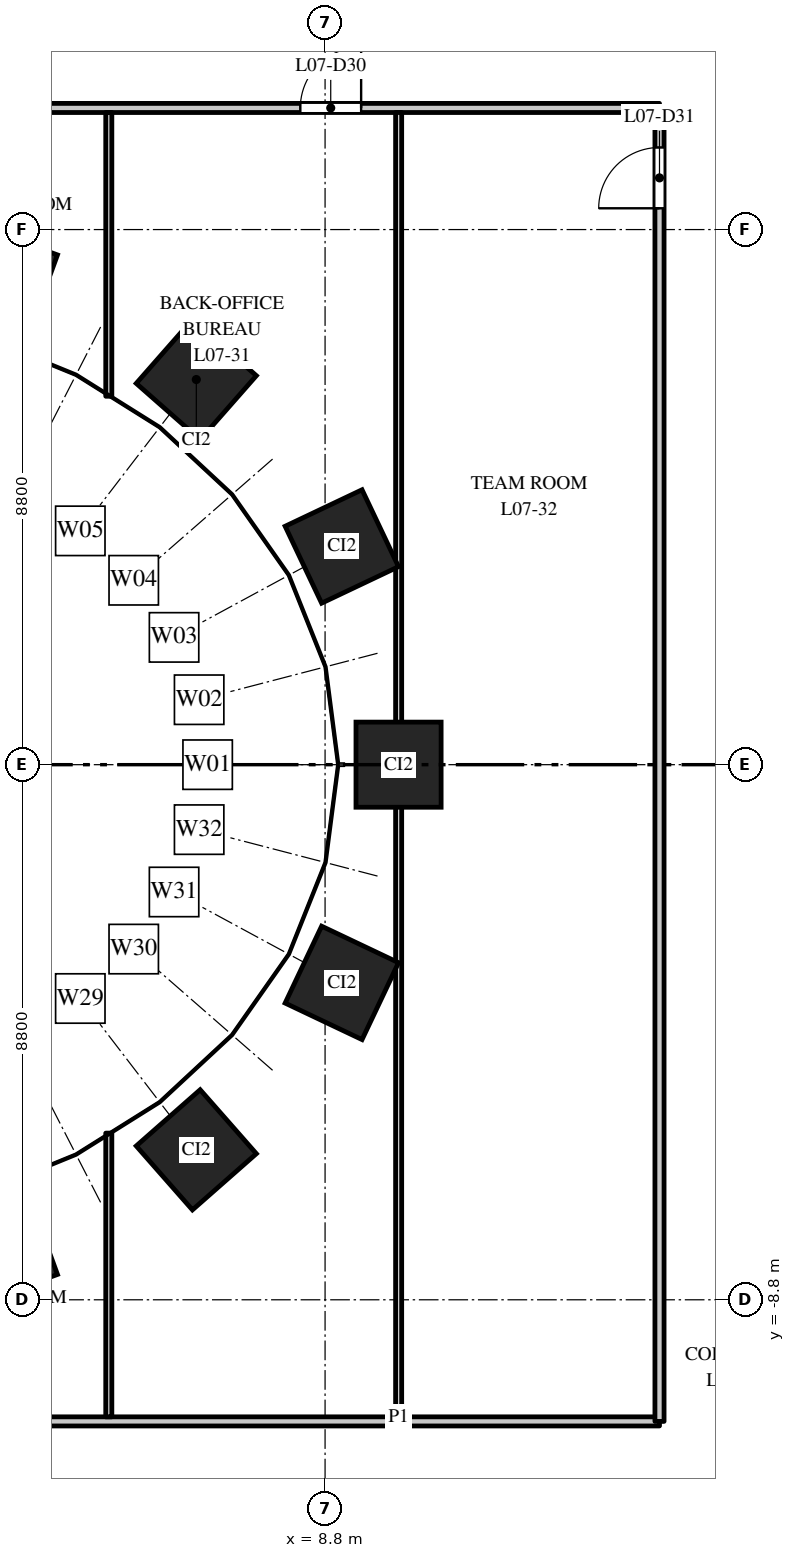
"""IFC4 building model, lengths in metres.
Left out: names, types, materials, properties, quantities, classifications, styles, units other than length and angle.
Written with IfcOpenShell. Run it as: python <this file> out.ifc"""

import sys

from ifc_helpers import new_model, si_unit, direction, frame, frame_2d, origin, origin_2d, place, context, subcontext, project, spatial, rectangle, extrude, element, fill, save


model = new_model("IFC4")
c1 = context("Model", 3, precision=1e-05, world=origin(), true_north=direction((0.0, 1.0)))
c2 = subcontext(c1, "Body", "Model", "MODEL_VIEW")
j1 = project(units=[si_unit("LENGTHUNIT", "METRE"), si_unit("PLANEANGLEUNIT", "RADIAN")], contexts=[c1])
p1 = place(None, origin())
s1 = spatial("IfcSite", under=j1, at=p1, CompositionType="ELEMENT")
p2 = place(p1, origin())
s2 = spatial("IfcBuilding", under=s1, at=p2, CompositionType="ELEMENT")
p3 = place(p2, frame((0.0, 0.0, 38.5)))
s3 = spatial("IfcBuildingStorey", under=s2, at=p3, CompositionType="ELEMENT", Elevation=38.5)
for number, where, z_axis, x_axis in (
    (1, (10.008, 0.0, 0.0), (0.0, 0.0, 1.0), (0.0, 1.0, 0.0)),
    (2, (9.076, 3.588, 0.0), (0.0, 0.0, 1.0), (-0.429, 0.903, 0.0)),
    (3, (6.682, 6.334, 0.0), (0.0, 0.0, 1.0), (-0.751, 0.66, 0.0)),
    (4, (3.501, 7.967, 0.0), (0.0, 0.0, 1.0), (-0.939, 0.344, 0.0)),
    (5, (3.501, -7.967, 0.0), (0.0, 0.0, 1.0), (0.939, 0.344, 0.0)),
    (6, (6.682, -6.334, 0.0), (0.0, 0.0, 1.0), (0.751, 0.66, 0.0)),
    (7, (9.076, -3.588, 0.0), (0.0, 0.0, 1.0), (0.429, 0.903, 0.0)),
):
    element("IfcColumn", number, at=place(p3, frame(where, z_axis=z_axis, x_axis=x_axis)), inside=s3, PredefinedType="COLUMN", context=c2, shape_type="SweptSolid", body=[
        extrude(rectangle(XDim=1.4, YDim=1.4, at=origin_2d()), origin(), (0.0, 0.0, 1.0), 4.0),
    ])
p4 = place(p3, frame((-14.3, -10.8, 0.0), z_axis=(0.0, 0.0, 1.0), x_axis=(1.0, 0.0, 0.0)))
e8 = element("IfcWall", 8, at=p4, inside=s3, PredefinedType="PARTITIONING", context=c2, shape_type="SweptSolid", body=[
    extrude(rectangle(XDim=28.6, YDim=0.15, at=frame_2d((14.3, 0.0))), origin(), (0.0, 0.0, 1.0), 2.85),
])
p5 = place(p4, frame((10.627, 0.0, 0.0)))
e9 = element("IfcOpeningElement", 9, at=p5, cuts=e8, PredefinedType="OPENING", context=c2, shape_type="SweptSolid", body=[
    extrude(rectangle(XDim=1.0, YDim=2.1, at=frame_2d((0.5, 1.05))), frame((0.0, 0.085, 0.0), z_axis=(0.0, -1.0, 0.0), x_axis=(1.0, 0.0, 0.0)), (0.0, 0.0, 1.0), 0.17),
])
p6 = place(p4, frame((15.393, 0.0, 0.0)))
e10 = element("IfcOpeningElement", 10, at=p6, cuts=e8, PredefinedType="OPENING", context=c2, shape_type="SweptSolid", body=[
    extrude(rectangle(XDim=1.0, YDim=2.1, at=frame_2d((0.5, 1.05))), frame((0.0, 0.085, 0.0), z_axis=(0.0, -1.0, 0.0), x_axis=(1.0, 0.0, 0.0)), (0.0, 0.0, 1.0), 0.17),
])
p7 = place(p3, frame((-14.3, 10.8, 0.0), z_axis=(0.0, 0.0, 1.0), x_axis=(1.0, 0.0, 0.0)))
e11 = element("IfcWall", 11, at=p7, inside=s3, PredefinedType="PARTITIONING", context=c2, shape_type="SweptSolid", body=[
    extrude(rectangle(XDim=28.6, YDim=0.15, at=frame_2d((14.3, 0.0))), origin(), (0.0, 0.0, 1.0), 2.85),
])
p8 = place(p7, frame((10.66, 0.0, 0.0)))
e12 = element("IfcOpeningElement", 12, at=p8, cuts=e11, PredefinedType="OPENING", context=c2, shape_type="SweptSolid", body=[
    extrude(rectangle(XDim=1.0, YDim=2.1, at=frame_2d((0.5, 1.05))), frame((0.0, 0.085, 0.0), z_axis=(0.0, -1.0, 0.0), x_axis=(1.0, 0.0, 0.0)), (0.0, 0.0, 1.0), 0.17),
])
p9 = place(p7, frame((15.427, 0.0, 0.0)))
e13 = element("IfcOpeningElement", 13, at=p9, cuts=e11, PredefinedType="OPENING", context=c2, shape_type="SweptSolid", body=[
    extrude(rectangle(XDim=1.0, YDim=2.1, at=frame_2d((0.5, 1.05))), frame((0.0, 0.085, 0.0), z_axis=(0.0, -1.0, 0.0), x_axis=(1.0, 0.0, 0.0)), (0.0, 0.0, 1.0), 0.17),
])
p10 = place(p7, frame((22.693, 0.0, 0.0)))
e14 = element("IfcOpeningElement", 14, at=p10, cuts=e11, PredefinedType="OPENING", context=c2, shape_type="SweptSolid", body=[
    extrude(rectangle(XDim=1.0, YDim=2.1, at=frame_2d((0.5, 1.05))), frame((0.0, 0.085, 0.0), z_axis=(0.0, -1.0, 0.0), x_axis=(1.0, 0.0, 0.0)), (0.0, 0.0, 1.0), 0.17),
])
for number, where, z_axis, x_axis in (
    (15, (5.243, -10.725, 0.0), (0.0, 0.0, 1.0), (0.0, 1.0, 0.0)),
    (16, (5.243, 6.059, 0.0), (0.0, 0.0, 1.0), (0.0, 1.0, 0.0)),
):
    element("IfcWall", number, at=place(p3, frame(where, z_axis=z_axis, x_axis=x_axis)), inside=s3, PredefinedType="PARTITIONING", context=c2, shape_type="SweptSolid", body=[
        extrude(rectangle(XDim=4.666, YDim=0.1, at=frame_2d((2.333, 0.0))), origin(), (0.0, 0.0, 1.0), 2.85),
    ])
p11 = place(p3, frame((10.01, -10.725, 0.0), z_axis=(0.0, 0.0, 1.0), x_axis=(0.0, 1.0, 0.0)))
e17 = element("IfcWall", 17, at=p11, inside=s3, PredefinedType="PARTITIONING", context=c2, shape_type="SweptSolid", body=[
    extrude(rectangle(XDim=21.45, YDim=0.1, at=frame_2d((10.725, 0.0))), origin(), (0.0, 0.0, 1.0), 2.75),
])
p12 = place(p3, frame((14.3, -10.8, 0.0), z_axis=(0.0, 0.0, 1.0), x_axis=(0.0, 1.0, 0.0)))
e18 = element("IfcWall", 18, at=p12, inside=s3, PredefinedType="PARTITIONING", context=c2, shape_type="SweptSolid", body=[
    extrude(rectangle(XDim=21.6, YDim=0.15, at=frame_2d((10.8, 0.0))), origin(), (0.0, 0.0, 1.0), 2.75),
])
p13 = place(p12, frame((19.95, 0.0, 0.0)))
e19 = element("IfcOpeningElement", 19, at=p13, cuts=e18, PredefinedType="OPENING", context=c2, shape_type="SweptSolid", body=[
    extrude(rectangle(XDim=1.0, YDim=2.1, at=frame_2d((0.5, 1.05))), frame((0.0, 0.085, 0.0), z_axis=(0.0, -1.0, 0.0), x_axis=(1.0, 0.0, 0.0)), (0.0, 0.0, 1.0), 0.17),
])
p14 = place(p10, origin())
e20 = element("IfcDoor", 20, at=p14, inside=s3, OperationType="SINGLE_SWING_RIGHT", PredefinedType="DOOR", context=c2, shape_type="SweptSolid", body=[
    extrude(rectangle(XDim=1.0, YDim=2.1, at=frame_2d((0.5, 1.05))), frame((0.0, 0.025, 0.0), z_axis=(0.0, -1.0, 0.0), x_axis=(1.0, 0.0, 0.0)), (0.0, 0.0, 1.0), 0.05),
])
fill(e14, e20)
p15 = place(p13, origin())
e21 = element("IfcDoor", 21, at=p15, inside=s3, OperationType="SINGLE_SWING_LEFT", PredefinedType="DOOR", context=c2, shape_type="SweptSolid", body=[
    extrude(rectangle(XDim=1.0, YDim=2.1, at=frame_2d((0.5, 1.05))), frame((0.0, 0.025, 0.0), z_axis=(0.0, -1.0, 0.0), x_axis=(1.0, 0.0, 0.0)), (0.0, 0.0, 1.0), 0.05),
])
fill(e19, e21)
save(model, sys.argv[1])
